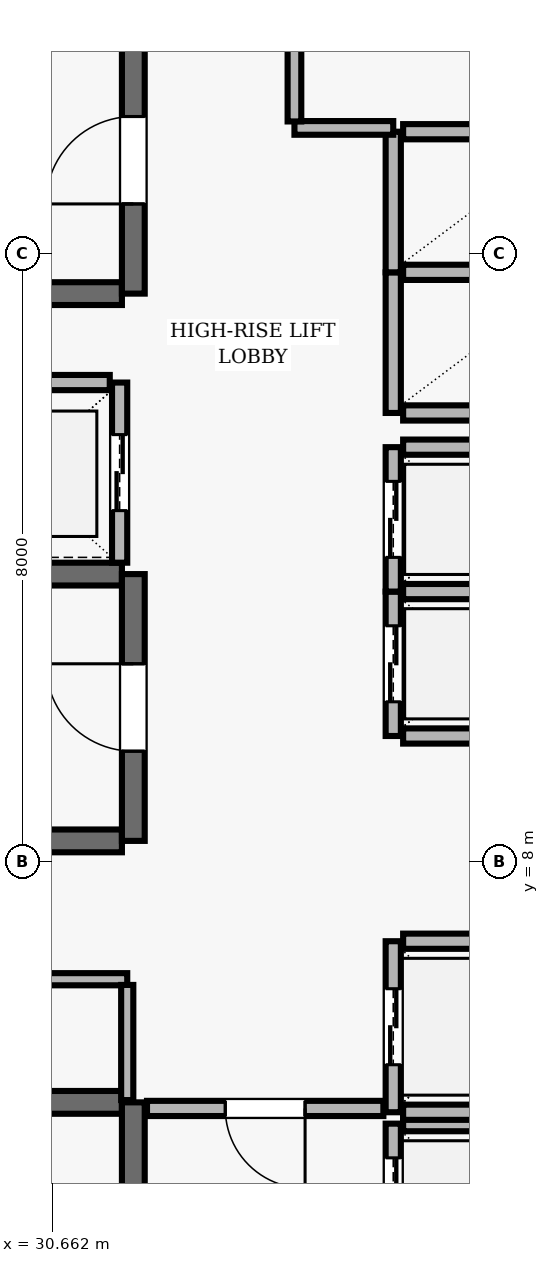
"""IFC4 building model, lengths in metres.
Left out: names, types, materials, properties, quantities, classifications, styles, units other than length and angle.
Written with IfcOpenShell. Run it as: python <this file> out.ifc"""

import sys

from ifc_helpers import new_model, si_unit, direction, frame, frame_2d, origin, place, context, subcontext, project, spatial, rectangle, extrude, element, fill, save


model = new_model("IFC4")
c1 = context("Model", 3, precision=1e-05, world=origin(), true_north=direction((0.0, 1.0)))
c2 = subcontext(c1, "Body", "Model", "MODEL_VIEW")
j1 = project(units=[si_unit("LENGTHUNIT", "METRE"), si_unit("PLANEANGLEUNIT", "RADIAN")], contexts=[c1])
p1 = place(None, origin())
s1 = spatial("IfcSite", under=j1, at=p1, CompositionType="ELEMENT")
p2 = place(p1, origin())
s2 = spatial("IfcBuilding", under=s1, at=p2, CompositionType="ELEMENT")
p3 = place(p2, frame((0.0, 0.0, 187.5)))
s3 = spatial("IfcBuildingStorey", under=s2, at=p3, CompositionType="ELEMENT", Elevation=187.5)
p4 = place(p3, frame((31.58, 4.83, 0.0), z_axis=(0.0, 0.0, 1.0), x_axis=(-1.0, 0.0, 0.0)))
e1 = element("IfcWall", 1, at=p4, inside=s3, PredefinedType="SHEAR", context=c2, shape_type="SweptSolid", body=[
    extrude(rectangle(XDim=8.36, YDim=0.3, at=frame_2d((4.18, 0.0))), origin(), (0.0, 0.0, 1.0), 3.69),
])
p5 = place(p3, frame((31.73, 0.96, 0.0), z_axis=(0.0, 0.0, 1.0), x_axis=(0.0, 1.0, 0.0)))
e2 = element("IfcWall", 2, at=p5, inside=s3, PredefinedType="SHEAR", context=c2, shape_type="SweptSolid", body=[
    extrude(rectangle(XDim=3.87, YDim=0.3, at=frame_2d((1.935, 0.0))), origin(), (0.0, 0.0, 1.0), 3.69),
])
p6 = place(p5, frame((1.54, 0.0, 0.0)))
e3 = element("IfcOpeningElement", 3, at=p6, cuts=e2, PredefinedType="OPENING", context=c2, shape_type="SweptSolid", body=[
    extrude(rectangle(XDim=1.15, YDim=2.15, at=frame_2d((0.575, 1.075))), frame((0.0, 0.16, 0.0), z_axis=(0.0, -1.0, 0.0), x_axis=(1.0, 0.0, 0.0)), (0.0, 0.0, 1.0), 0.32),
])
p7 = place(p3, frame((23.22, 15.47, 0.0), z_axis=(0.0, 0.0, 1.0), x_axis=(1.0, 0.0, 0.0)))
e4 = element("IfcWall", 4, at=p7, inside=s3, PredefinedType="SHEAR", context=c2, shape_type="SweptSolid", body=[
    extrude(rectangle(XDim=8.36, YDim=0.3, at=frame_2d((4.18, 0.0))), origin(), (0.0, 0.0, 1.0), 3.69),
])
p8 = place(p3, frame((31.73, 15.47, 0.0), z_axis=(0.0, 0.0, 1.0), x_axis=(0.0, 1.0, 0.0)))
e5 = element("IfcWall", 5, at=p8, inside=s3, PredefinedType="SHEAR", context=c2, shape_type="SweptSolid", body=[
    extrude(rectangle(XDim=3.51, YDim=0.3, at=frame_2d((1.755, 0.0))), origin(), (0.0, 0.0, 1.0), 3.69),
])
p9 = place(p8, frame((1.18, 0.0, 0.0)))
e6 = element("IfcOpeningElement", 6, at=p9, cuts=e5, PredefinedType="OPENING", context=c2, shape_type="SweptSolid", body=[
    extrude(rectangle(XDim=1.15, YDim=2.15, at=frame_2d((0.575, 1.075))), frame((0.0, 0.16, 0.0), z_axis=(0.0, -1.0, 0.0), x_axis=(1.0, 0.0, 0.0)), (0.0, 0.0, 1.0), 0.32),
])
for number, where, z_axis, x_axis in (
    (7, (31.58, 11.78, 0.0), (0.0, 0.0, 1.0), (-1.0, 0.0, 0.0)),
    (8, (23.22, 8.27, 0.0), (0.0, 0.0, 1.0), (1.0, 0.0, 0.0)),
):
    element("IfcWall", number, at=place(p3, frame(where, z_axis=z_axis, x_axis=x_axis)), inside=s3, PredefinedType="SHEAR", context=c2, shape_type="SweptSolid", body=[
        extrude(rectangle(XDim=8.36, YDim=0.3, at=frame_2d((4.18, 0.0))), origin(), (0.0, 0.0, 1.0), 3.69),
    ])
p10 = place(p3, frame((31.73, 8.27, 0.0), z_axis=(0.0, 0.0, 1.0), x_axis=(0.0, 1.0, 0.0)))
e9 = element("IfcWall", 9, at=p10, inside=s3, PredefinedType="SHEAR", context=c2, shape_type="SweptSolid", body=[
    extrude(rectangle(XDim=3.51, YDim=0.3, at=frame_2d((1.755, 0.0))), origin(), (0.0, 0.0, 1.0), 3.69),
])
p11 = place(p10, frame((1.18, 0.0, 0.0)))
e10 = element("IfcOpeningElement", 10, at=p11, cuts=e9, PredefinedType="OPENING", context=c2, shape_type="SweptSolid", body=[
    extrude(rectangle(XDim=1.15, YDim=2.15, at=frame_2d((0.575, 1.075))), frame((0.0, 0.16, 0.0), z_axis=(0.0, -1.0, 0.0), x_axis=(1.0, 0.0, 0.0)), (0.0, 0.0, 1.0), 0.32),
])
p12 = place(p3, frame((35.15, 4.55, 0.0), z_axis=(0.0, 0.0, 1.0), x_axis=(0.0, -1.0, 0.0)))
e11 = element("IfcWall", 11, at=p12, inside=s3, PredefinedType="SOLIDWALL", context=c2, shape_type="SweptSolid", body=[
    extrude(rectangle(XDim=2.1, YDim=0.2, at=frame_2d((1.05, 0.0))), origin(), (0.0, 0.0, 1.0), 3.69),
])
p13 = place(p12, frame((0.45, 0.0, 0.0)))
e12 = element("IfcOpeningElement", 12, at=p13, cuts=e11, PredefinedType="OPENING", context=c2, shape_type="SweptSolid", body=[
    extrude(rectangle(XDim=1.2, YDim=2.15, at=frame_2d((0.6, 1.075))), frame((0.0, 0.11, 0.0), z_axis=(0.0, -1.0, 0.0), x_axis=(1.0, 0.0, 0.0)), (0.0, 0.0, 1.0), 0.22),
])
p14 = place(p3, frame((37.42, 4.55, 0.0), z_axis=(0.0, 0.0, 1.0), x_axis=(-1.0, 0.0, 0.0)))
e13 = element("IfcWall", 13, at=p14, inside=s3, PredefinedType="SOLIDWALL", context=c2, shape_type="SweptSolid", body=[
    extrude(rectangle(XDim=2.14, YDim=0.2, at=frame_2d((1.07, 0.0))), origin(), (0.0, 0.0, 1.0), 3.69),
])
p15 = place(p3, frame((35.15, 6.95, 0.0), z_axis=(0.0, 0.0, 1.0), x_axis=(0.0, -1.0, 0.0)))
e14 = element("IfcWall", 14, at=p15, inside=s3, PredefinedType="SOLIDWALL", context=c2, shape_type="SweptSolid", body=[
    extrude(rectangle(XDim=2.25, YDim=0.2, at=frame_2d((1.125, 0.0))), origin(), (0.0, 0.0, 1.0), 3.69),
])
p16 = place(p15, frame((0.625, 0.0, 0.0)))
e15 = element("IfcOpeningElement", 15, at=p16, cuts=e14, PredefinedType="OPENING", context=c2, shape_type="SweptSolid", body=[
    extrude(rectangle(XDim=1.0, YDim=2.1, at=frame_2d((0.5, 1.05))), frame((0.0, 0.11, 0.0), z_axis=(0.0, -1.0, 0.0), x_axis=(1.0, 0.0, 0.0)), (0.0, 0.0, 1.0), 0.22),
])
for number, where, z_axis, x_axis in (
    (16, (35.28, 4.7, 0.0), (0.0, 0.0, 1.0), (1.0, 0.0, 0.0)),
    (17, (37.42, 6.95, 0.0), (0.0, 0.0, 1.0), (-1.0, 0.0, 0.0)),
):
    element("IfcWall", number, at=place(p3, frame(where, z_axis=z_axis, x_axis=x_axis)), inside=s3, PredefinedType="SOLIDWALL", context=c2, shape_type="SweptSolid", body=[
        extrude(rectangle(XDim=2.14, YDim=0.2, at=frame_2d((1.07, 0.0))), origin(), (0.0, 0.0, 1.0), 3.69),
    ])
p17 = place(p3, frame((35.15, 11.55, 0.0), z_axis=(0.0, 0.0, 1.0), x_axis=(0.0, -1.0, 0.0)))
e18 = element("IfcWall", 18, at=p17, inside=s3, PredefinedType="SOLIDWALL", context=c2, shape_type="SweptSolid", body=[
    extrude(rectangle(XDim=1.9, YDim=0.2, at=frame_2d((0.95, 0.0))), origin(), (0.0, 0.0, 1.0), 3.69),
])
p18 = place(p17, frame((0.45, 0.0, 0.0)))
e19 = element("IfcOpeningElement", 19, at=p18, cuts=e18, PredefinedType="OPENING", context=c2, shape_type="SweptSolid", body=[
    extrude(rectangle(XDim=1.0, YDim=2.1, at=frame_2d((0.5, 1.05))), frame((0.0, 0.11, 0.0), z_axis=(0.0, -1.0, 0.0), x_axis=(1.0, 0.0, 0.0)), (0.0, 0.0, 1.0), 0.22),
])
for number, where, z_axis, x_axis in (
    (20, (35.28, 9.65, 0.0), (0.0, 0.0, 1.0), (1.0, 0.0, 0.0)),
    (21, (37.42, 11.55, 0.0), (0.0, 0.0, 1.0), (-1.0, 0.0, 0.0)),
):
    element("IfcWall", number, at=place(p3, frame(where, z_axis=z_axis, x_axis=x_axis)), inside=s3, PredefinedType="SOLIDWALL", context=c2, shape_type="SweptSolid", body=[
        extrude(rectangle(XDim=2.14, YDim=0.2, at=frame_2d((1.07, 0.0))), origin(), (0.0, 0.0, 1.0), 3.69),
    ])
p19 = place(p3, frame((35.15, 13.45, 0.0), z_axis=(0.0, 0.0, 1.0), x_axis=(0.0, -1.0, 0.0)))
e22 = element("IfcWall", 22, at=p19, inside=s3, PredefinedType="SOLIDWALL", context=c2, shape_type="SweptSolid", body=[
    extrude(rectangle(XDim=1.9, YDim=0.2, at=frame_2d((0.95, 0.0))), origin(), (0.0, 0.0, 1.0), 3.69),
])
p20 = place(p19, frame((0.45, 0.0, 0.0)))
e23 = element("IfcOpeningElement", 23, at=p20, cuts=e22, PredefinedType="OPENING", context=c2, shape_type="SweptSolid", body=[
    extrude(rectangle(XDim=1.0, YDim=2.1, at=frame_2d((0.5, 1.05))), frame((0.0, 0.11, 0.0), z_axis=(0.0, -1.0, 0.0), x_axis=(1.0, 0.0, 0.0)), (0.0, 0.0, 1.0), 0.22),
])
p21 = place(p3, frame((37.42, 13.45, 0.0), z_axis=(0.0, 0.0, 1.0), x_axis=(-1.0, 0.0, 0.0)))
e24 = element("IfcWall", 24, at=p21, inside=s3, PredefinedType="SOLIDWALL", context=c2, shape_type="SweptSolid", body=[
    extrude(rectangle(XDim=2.14, YDim=0.2, at=frame_2d((1.07, 0.0))), origin(), (0.0, 0.0, 1.0), 3.69),
])
p22 = place(p3, frame((31.55, 11.93, 0.0), z_axis=(0.0, 0.0, 1.0), x_axis=(0.0, 1.0, 0.0)))
e25 = element("IfcWall", 25, at=p22, inside=s3, PredefinedType="SOLIDWALL", context=c2, shape_type="SweptSolid", body=[
    extrude(rectangle(XDim=2.37, YDim=0.2, at=frame_2d((1.185, 0.0))), origin(), (0.0, 0.0, 1.0), 3.69),
])
p23 = place(p22, frame((0.685, 0.0, 0.0)))
e26 = element("IfcOpeningElement", 26, at=p23, cuts=e25, PredefinedType="OPENING", context=c2, shape_type="SweptSolid", body=[
    extrude(rectangle(XDim=1.0, YDim=2.1, at=frame_2d((0.5, 1.05))), frame((0.0, 0.11, 0.0), z_axis=(0.0, -1.0, 0.0), x_axis=(1.0, 0.0, 0.0)), (0.0, 0.0, 1.0), 0.22),
])
p24 = place(p3, frame((31.42, 14.3, 0.0), z_axis=(0.0, 0.0, 1.0), x_axis=(-1.0, 0.0, 0.0)))
e27 = element("IfcWall", 27, at=p24, inside=s3, PredefinedType="SOLIDWALL", context=c2, shape_type="SweptSolid", body=[
    extrude(rectangle(XDim=2.44, YDim=0.2, at=frame_2d((1.22, 0.0))), origin(), (0.0, 0.0, 1.0), 3.69),
])
p25 = place(p3, frame((35.15, 15.75, 0.0), z_axis=(0.0, 0.0, 1.0), x_axis=(0.0, -1.0, 0.0)))
e28 = element("IfcWall", 28, at=p25, inside=s3, PredefinedType="SOLIDWALL", context=c2, shape_type="SweptSolid", body=[
    extrude(rectangle(XDim=1.85, YDim=0.2, at=frame_2d((0.925, 0.0))), origin(), (0.0, 0.0, 1.0), 3.69),
])
for number, where, z_axis, x_axis in (
    (29, (35.28, 13.9, 0.0), (0.0, 0.0, 1.0), (1.0, 0.0, 0.0)),
    (30, (37.42, 15.75, 0.0), (0.0, 0.0, 1.0), (-1.0, 0.0, 0.0)),
):
    element("IfcWall", number, at=place(p3, frame(where, z_axis=z_axis, x_axis=x_axis)), inside=s3, PredefinedType="SOLIDWALL", context=c2, shape_type="SweptSolid", body=[
        extrude(rectangle(XDim=2.14, YDim=0.2, at=frame_2d((1.07, 0.0))), origin(), (0.0, 0.0, 1.0), 3.69),
    ])
p26 = place(p3, frame((35.15, 17.6, 0.0), z_axis=(0.0, 0.0, 1.0), x_axis=(0.0, -1.0, 0.0)))
e31 = element("IfcWall", 31, at=p26, inside=s3, PredefinedType="SOLIDWALL", context=c2, shape_type="SweptSolid", body=[
    extrude(rectangle(XDim=1.85, YDim=0.2, at=frame_2d((0.925, 0.0))), origin(), (0.0, 0.0, 1.0), 3.69),
])
p27 = place(p3, frame((37.42, 17.6, 0.0), z_axis=(0.0, 0.0, 1.0), x_axis=(-1.0, 0.0, 0.0)))
e32 = element("IfcWall", 32, at=p27, inside=s3, PredefinedType="SOLIDWALL", context=c2, shape_type="SweptSolid", body=[
    extrude(rectangle(XDim=2.14, YDim=0.2, at=frame_2d((1.07, 0.0))), origin(), (0.0, 0.0, 1.0), 3.69),
])
p28 = place(p3, frame((28.55, 6.45, 0.0), z_axis=(0.0, 0.0, 1.0), x_axis=(1.0, 0.0, 0.0)))
e33 = element("IfcWall", 33, at=p28, inside=s3, PredefinedType="PARTITIONING", context=c2, shape_type="SweptSolid", body=[
    extrude(rectangle(XDim=3.1, YDim=0.16, at=frame_2d((1.55, 0.0))), origin(), (0.0, 0.0, 1.0), 3.69),
])
p29 = place(p28, frame((1.11, 0.0, 0.0)))
e34 = element("IfcOpeningElement", 34, at=p29, cuts=e33, PredefinedType="OPENING", context=c2, shape_type="SweptSolid", body=[
    extrude(rectangle(XDim=0.88, YDim=2.1, at=frame_2d((0.44, 1.05))), frame((0.0, 0.09, 0.0), z_axis=(0.0, -1.0, 0.0), x_axis=(1.0, 0.0, 0.0)), (0.0, 0.0, 1.0), 0.18),
])
p30 = place(p3, frame((33.85, 17.65, 0.0), z_axis=(0.0, 0.0, 1.0), x_axis=(1.0, 0.0, 0.0)))
e35 = element("IfcWall", 35, at=p30, inside=s3, PredefinedType="PARTITIONING", context=c2, shape_type="SweptSolid", body=[
    extrude(rectangle(XDim=1.3, YDim=0.18, at=frame_2d((0.65, 0.0))), origin(), (0.0, 0.0, 1.0), 3.69),
])
p31 = place(p3, frame((35.02, 4.75, 0.0), z_axis=(0.0, 0.0, 1.0), x_axis=(-1.0, 0.0, 0.0)))
e36 = element("IfcWall", 36, at=p31, inside=s3, PredefinedType="SOLIDWALL", context=c2, shape_type="SweptSolid", body=[
    extrude(rectangle(XDim=3.11, YDim=0.2, at=frame_2d((1.555, 0.0))), origin(), (0.0, 0.0, 1.0), 3.69),
])
p32 = place(p31, frame((1.03, 0.0, 0.0)))
e37 = element("IfcOpeningElement", 37, at=p32, cuts=e36, PredefinedType="OPENING", context=c2, shape_type="SweptSolid", body=[
    extrude(rectangle(XDim=1.05, YDim=2.15, at=frame_2d((0.525, 1.075))), frame((0.0, 0.11, 0.0), z_axis=(0.0, -1.0, 0.0), x_axis=(1.0, 0.0, 0.0)), (0.0, 0.0, 1.0), 0.22),
])
p33 = place(p3, frame((31.65, 4.86, 0.0), z_axis=(0.0, 0.0, 1.0), x_axis=(0.0, 1.0, 0.0)))
e38 = element("IfcWall", 38, at=p33, inside=s3, PredefinedType="PARTITIONING", context=c2, shape_type="SweptSolid", body=[
    extrude(rectangle(XDim=1.515, YDim=0.16, at=frame_2d((0.757, 0.0))), origin(), (0.0, 0.0, 1.0), 3.69),
])
p34 = place(p3, frame((33.85, 17.735, 0.0), z_axis=(0.0, 0.0, 1.0), x_axis=(0.0, 1.0, 0.0)))
e39 = element("IfcWall", 39, at=p34, inside=s3, PredefinedType="PARTITIONING", context=c2, shape_type="SweptSolid", body=[
    extrude(rectangle(XDim=6.03, YDim=0.18, at=frame_2d((3.015, 0.0))), origin(), (0.0, 0.0, 1.0), 3.69),
])
p35 = place(p34, frame((2.54, 0.0, 0.0)))
e40 = element("IfcOpeningElement", 40, at=p35, cuts=e39, PredefinedType="OPENING", context=c2, shape_type="SweptSolid", body=[
    extrude(rectangle(XDim=0.95, YDim=2.1, at=frame_2d((0.475, 1.05))), frame((0.0, 0.1, 0.0), z_axis=(0.0, -1.0, 0.0), x_axis=(1.0, 0.0, 0.0)), (0.0, 0.0, 1.0), 0.2),
])
p36 = place(p9, origin())
e41 = element("IfcDoor", 41, at=p36, inside=s3, OperationType="SINGLE_SWING_LEFT", PredefinedType="DOOR", context=c2, shape_type="SweptSolid", body=[
    extrude(rectangle(XDim=1.15, YDim=2.15, at=frame_2d((0.575, 1.075))), frame((0.0, 0.025, 0.0), z_axis=(0.0, -1.0, 0.0), x_axis=(1.0, 0.0, 0.0)), (0.0, 0.0, 1.0), 0.05),
])
fill(e6, e41)
p37 = place(p11, origin())
e42 = element("IfcDoor", 42, at=p37, inside=s3, OperationType="SINGLE_SWING_RIGHT", PredefinedType="DOOR", context=c2, shape_type="SweptSolid", body=[
    extrude(rectangle(XDim=1.15, YDim=2.15, at=frame_2d((0.575, 1.075))), frame((0.0, 0.025, 0.0), z_axis=(0.0, -1.0, 0.0), x_axis=(1.0, 0.0, 0.0)), (0.0, 0.0, 1.0), 0.05),
])
fill(e10, e42)
p38 = place(p13, origin())
e43 = element("IfcDoor", 43, at=p38, inside=s3, OperationType="DOUBLE_DOOR_SLIDING", PredefinedType="DOOR", context=c2, shape_type="SweptSolid", body=[
    extrude(rectangle(XDim=1.2, YDim=2.15, at=frame_2d((0.6, 1.075))), frame((0.0, 0.025, 0.0), z_axis=(0.0, -1.0, 0.0), x_axis=(1.0, 0.0, 0.0)), (0.0, 0.0, 1.0), 0.05),
])
fill(e12, e43)
p39 = place(p16, origin())
e44 = element("IfcDoor", 44, at=p39, inside=s3, OperationType="DOUBLE_DOOR_SLIDING", PredefinedType="DOOR", context=c2, shape_type="SweptSolid", body=[
    extrude(rectangle(XDim=1.0, YDim=2.1, at=frame_2d((0.5, 1.05))), frame((0.0, 0.025, 0.0), z_axis=(0.0, -1.0, 0.0), x_axis=(1.0, 0.0, 0.0)), (0.0, 0.0, 1.0), 0.05),
])
fill(e15, e44)
p40 = place(p18, origin())
e45 = element("IfcDoor", 45, at=p40, inside=s3, OperationType="DOUBLE_DOOR_SLIDING", PredefinedType="DOOR", context=c2, shape_type="SweptSolid", body=[
    extrude(rectangle(XDim=1.0, YDim=2.1, at=frame_2d((0.5, 1.05))), frame((0.0, 0.025, 0.0), z_axis=(0.0, -1.0, 0.0), x_axis=(1.0, 0.0, 0.0)), (0.0, 0.0, 1.0), 0.05),
])
fill(e19, e45)
p41 = place(p20, origin())
e46 = element("IfcDoor", 46, at=p41, inside=s3, OperationType="DOUBLE_DOOR_SLIDING", PredefinedType="DOOR", context=c2, shape_type="SweptSolid", body=[
    extrude(rectangle(XDim=1.0, YDim=2.1, at=frame_2d((0.5, 1.05))), frame((0.0, 0.025, 0.0), z_axis=(0.0, -1.0, 0.0), x_axis=(1.0, 0.0, 0.0)), (0.0, 0.0, 1.0), 0.05),
])
fill(e23, e46)
p42 = place(p23, origin())
e47 = element("IfcDoor", 47, at=p42, inside=s3, OperationType="DOUBLE_DOOR_SLIDING", PredefinedType="DOOR", context=c2, shape_type="SweptSolid", body=[
    extrude(rectangle(XDim=1.0, YDim=2.1, at=frame_2d((0.5, 1.05))), frame((0.0, 0.025, 0.0), z_axis=(0.0, -1.0, 0.0), x_axis=(1.0, 0.0, 0.0)), (0.0, 0.0, 1.0), 0.05),
])
fill(e26, e47)
p43 = place(p32, origin())
e48 = element("IfcDoor", 48, at=p43, inside=s3, OperationType="SINGLE_SWING_LEFT", PredefinedType="DOOR", context=c2, shape_type="SweptSolid", body=[
    extrude(rectangle(XDim=1.05, YDim=2.15, at=frame_2d((0.525, 1.075))), frame((0.0, 0.025, 0.0), z_axis=(0.0, -1.0, 0.0), x_axis=(1.0, 0.0, 0.0)), (0.0, 0.0, 1.0), 0.05),
])
fill(e37, e48)
save(model, sys.argv[1])
